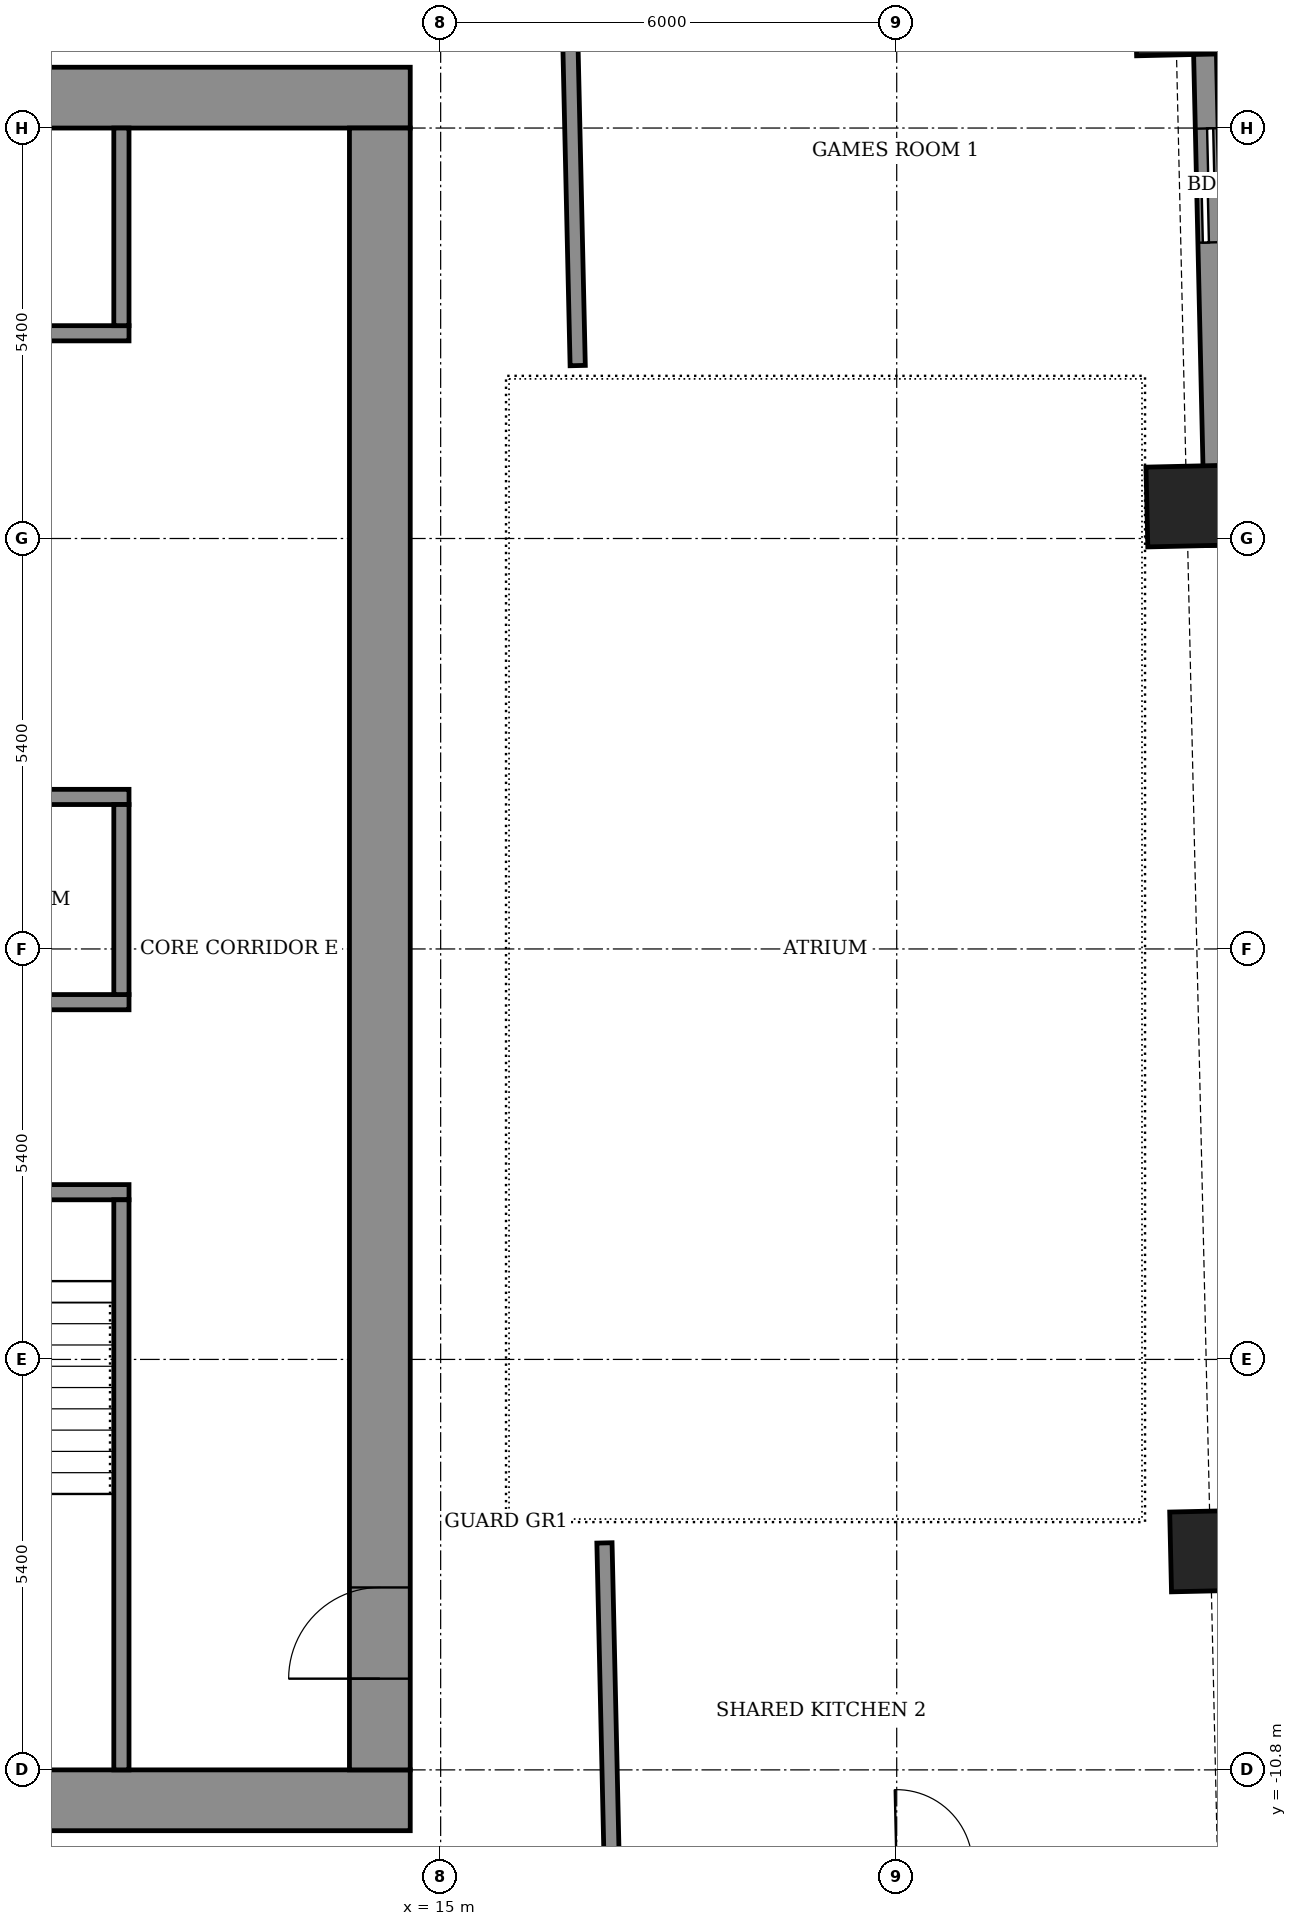
"""IFC4 building model, lengths in metres.
Left out: names, types, materials, properties, quantities, classifications, styles, units other than length and angle.
Written with IfcOpenShell. Run it as: python <this file> out.ifc"""

import sys

from ifc_helpers import new_model, si_unit, direction, frame, frame_2d, origin, origin_2d, place, context, subcontext, project, spatial, rectangle, extrude, element, fill, save


model = new_model("IFC4")
c1 = context("Model", 3, precision=1e-05, world=origin(), true_north=direction((0.0, 1.0)))
c2 = subcontext(c1, "Body", "Model", "MODEL_VIEW")
j1 = project(units=[si_unit("LENGTHUNIT", "METRE"), si_unit("PLANEANGLEUNIT", "RADIAN")], contexts=[c1])
p1 = place(None, origin())
s1 = spatial("IfcSite", under=j1, at=p1, CompositionType="ELEMENT")
p2 = place(p1, origin())
s2 = spatial("IfcBuilding", under=s1, at=p2, CompositionType="ELEMENT")
p3 = place(p2, frame((0.0, 0.0, 241.9)))
s3 = spatial("IfcBuildingStorey", under=s2, at=p3, CompositionType="ELEMENT", Elevation=241.9)
for number, where, z_axis, x_axis in (
    (1, (25.128, -7.921, -0.55), (0.0, 0.0, 1.0), (-0.023, 1.0, 0.0)),
    (2, (24.816, 5.826, -0.55), (0.0, 0.0, 1.0), (-0.023, 1.0, 0.0)),
    (3, (24.669, 12.287, -0.55), (0.0, 0.0, 1.0), (-0.023, 1.0, 0.0)),
):
    element("IfcColumn", number, at=place(p3, frame(where, z_axis=z_axis, x_axis=x_axis)), inside=s3, PredefinedType="COLUMN", context=c2, shape_type="SweptSolid", body=[
        extrude(rectangle(XDim=1.05, YDim=1.05, at=origin_2d()), origin(), (0.0, 0.0, 1.0), 3.6),
    ])
p4 = place(p3, frame((25.203, 5.31, 0.0), z_axis=(0.0, 0.0, 1.0), x_axis=(-0.022708061432, 0.999742138727, 0.0)))
e4 = element("IfcWall", 4, at=p4, inside=s3, PredefinedType="SOLIDWALL", context=c2, shape_type="SweptSolid", body=[
    extrude(rectangle(XDim=13.299, YDim=0.3, at=frame_2d((6.65, 0.0))), origin(), (0.0, 0.0, 1.0), 2.55),
])
p5 = place(p4, frame((3.986, 0.0, 0.0)))
e5 = element("IfcOpeningElement", 5, at=p5, cuts=e4, PredefinedType="OPENING", context=c2, shape_type="SweptSolid", body=[
    extrude(rectangle(XDim=1.5, YDim=2.4, at=frame_2d((0.75, 1.2))), frame((0.0, 0.16, 0.0), z_axis=(0.0, -1.0, 0.0), x_axis=(1.0, 0.0, 0.0)), (0.0, 0.0, 1.0), 0.32),
])
p6 = place(p4, frame((9.013, 0.0, 0.9)))
e6 = element("IfcOpeningElement", 6, at=p6, cuts=e4, PredefinedType="OPENING", context=c2, shape_type="SweptSolid", body=[
    extrude(rectangle(XDim=2.4, YDim=1.5, at=frame_2d((1.2, 0.75))), frame((0.0, 0.16, 0.0), z_axis=(0.0, -1.0, 0.0), x_axis=(1.0, 0.0, 0.0)), (0.0, 0.0, 1.0), 0.32),
])
p7 = place(p3, frame((17.253, -12.149, 0.0), z_axis=(0.0, 0.0, 1.0), x_axis=(-0.022578158225, 0.999745080894, 0.0)))
e7 = element("IfcWall", 7, at=p7, inside=s3, PredefinedType="PARTITIONING", context=c2, shape_type="SweptSolid", body=[
    extrude(rectangle(XDim=4.336, YDim=0.2, at=frame_2d((2.168, 0.0))), origin(), (0.0, 0.0, 1.0), 3.05),
])
p8 = place(p3, frame((16.803, 7.675, 0.0), z_axis=(0.0, 0.0, 1.0), x_axis=(-0.022667483124, 0.999743059595, 0.0)))
e8 = element("IfcWall", 8, at=p8, inside=s3, PredefinedType="PARTITIONING", context=c2, shape_type="SweptSolid", body=[
    extrude(rectangle(XDim=5.245, YDim=0.2, at=frame_2d((2.623, 0.0))), origin(), (0.0, 0.0, 1.0), 3.05),
])
for number, where, z_axis, x_axis in (
    (9, (-14.6, -11.2, 0.0), (0.0, 0.0, 1.0), (1.0, 0.0, 0.0)),
    (10, (-14.6, 11.2, 0.0), (0.0, 0.0, 1.0), (1.0, 0.0, 0.0)),
):
    element("IfcWall", number, at=place(p3, frame(where, z_axis=z_axis, x_axis=x_axis)), inside=s3, PredefinedType="SHEAR", context=c2, shape_type="SweptSolid", body=[
        extrude(rectangle(XDim=29.2, YDim=0.8, at=frame_2d((14.6, 0.0))), origin(), (0.0, 0.0, 1.0), 3.6),
    ])
p9 = place(p3, frame((14.2, -10.8, 0.0), z_axis=(0.0, 0.0, 1.0), x_axis=(0.0, 1.0, 0.0)))
e11 = element("IfcWall", 11, at=p9, inside=s3, PredefinedType="SHEAR", context=c2, shape_type="SweptSolid", body=[
    extrude(rectangle(XDim=21.6, YDim=0.8, at=frame_2d((10.8, 0.0))), origin(), (0.0, 0.0, 1.0), 3.6),
])
p10 = place(p9, frame((1.2, 0.0, 0.0)))
e12 = element("IfcOpeningElement", 12, at=p10, cuts=e11, PredefinedType="OPENING", context=c2, shape_type="SweptSolid", body=[
    extrude(rectangle(XDim=1.2, YDim=2.1, at=frame_2d((0.6, 1.05))), frame((0.0, 0.41, 0.0), z_axis=(0.0, -1.0, 0.0), x_axis=(1.0, 0.0, 0.0)), (0.0, 0.0, 1.0), 0.82),
])
p11 = place(p3, frame((-10.9, -3.2, 0.0), z_axis=(0.0, 0.0, 1.0), x_axis=(1.0, 0.0, 0.0)))
e13 = element("IfcWall", 13, at=p11, inside=s3, PredefinedType="SHEAR", context=c2, shape_type="SweptSolid", body=[
    extrude(rectangle(XDim=21.8, YDim=0.2, at=frame_2d((10.9, 0.0))), origin(), (0.0, 0.0, 1.0), 3.05),
])
p12 = place(p11, frame((1.075, 0.0, 0.0)))
e14 = element("IfcOpeningElement", 14, at=p12, cuts=e13, PredefinedType="OPENING", context=c2, shape_type="SweptSolid", body=[
    extrude(rectangle(XDim=1.1, YDim=2.1, at=frame_2d((0.55, 1.05))), frame((0.0, 0.11, 0.0), z_axis=(0.0, -1.0, 0.0), x_axis=(1.0, 0.0, 0.0)), (0.0, 0.0, 1.0), 0.22),
])
p13 = place(p11, frame((10.325, 0.0, 0.0)))
e15 = element("IfcOpeningElement", 15, at=p13, cuts=e13, PredefinedType="OPENING", context=c2, shape_type="SweptSolid", body=[
    extrude(rectangle(XDim=1.1, YDim=2.1, at=frame_2d((0.55, 1.05))), frame((0.0, 0.11, 0.0), z_axis=(0.0, -1.0, 0.0), x_axis=(1.0, 0.0, 0.0)), (0.0, 0.0, 1.0), 0.22),
])
p14 = place(p11, frame((19.625, 0.0, 0.0)))
e16 = element("IfcOpeningElement", 16, at=p14, cuts=e13, PredefinedType="OPENING", context=c2, shape_type="SweptSolid", body=[
    extrude(rectangle(XDim=1.1, YDim=2.1, at=frame_2d((0.55, 1.05))), frame((0.0, 0.11, 0.0), z_axis=(0.0, -1.0, 0.0), x_axis=(1.0, 0.0, 0.0)), (0.0, 0.0, 1.0), 0.22),
])
p15 = place(p11, frame((5.7, 0.0, 0.0)))
e17 = element("IfcOpeningElement", 17, at=p15, cuts=e13, PredefinedType="OPENING", context=c2, shape_type="SweptSolid", body=[
    extrude(rectangle(XDim=1.1, YDim=2.1, at=frame_2d((0.55, 1.05))), frame((0.0, 0.11, 0.0), z_axis=(0.0, -1.0, 0.0), x_axis=(1.0, 0.0, 0.0)), (0.0, 0.0, 1.0), 0.22),
])
p16 = place(p11, frame((14.975, 0.0, 0.0)))
e18 = element("IfcOpeningElement", 18, at=p16, cuts=e13, PredefinedType="OPENING", context=c2, shape_type="SweptSolid", body=[
    extrude(rectangle(XDim=1.1, YDim=2.1, at=frame_2d((0.55, 1.05))), frame((0.0, 0.11, 0.0), z_axis=(0.0, -1.0, 0.0), x_axis=(1.0, 0.0, 0.0)), (0.0, 0.0, 1.0), 0.22),
])
p17 = place(p3, frame((-10.9, -0.7, 0.0), z_axis=(0.0, 0.0, 1.0), x_axis=(1.0, 0.0, 0.0)))
e19 = element("IfcWall", 19, at=p17, inside=s3, PredefinedType="SHEAR", context=c2, shape_type="SweptSolid", body=[
    extrude(rectangle(XDim=21.8, YDim=0.2, at=frame_2d((10.9, 0.0))), origin(), (0.0, 0.0, 1.0), 3.05),
])
p18 = place(p3, frame((-10.9, 2.0, 0.0), z_axis=(0.0, 0.0, 1.0), x_axis=(1.0, 0.0, 0.0)))
e20 = element("IfcWall", 20, at=p18, inside=s3, PredefinedType="SHEAR", context=c2, shape_type="SweptSolid", body=[
    extrude(rectangle(XDim=21.8, YDim=0.2, at=frame_2d((10.9, 0.0))), origin(), (0.0, 0.0, 1.0), 3.05),
])
p19 = place(p18, frame((4.95, 0.0, 0.0)))
e21 = element("IfcOpeningElement", 21, at=p19, cuts=e20, PredefinedType="OPENING", context=c2, shape_type="SweptSolid", body=[
    extrude(rectangle(XDim=1.1, YDim=2.1, at=frame_2d((0.55, 1.05))), frame((0.0, 0.11, 0.0), z_axis=(0.0, -1.0, 0.0), x_axis=(1.0, 0.0, 0.0)), (0.0, 0.0, 1.0), 0.22),
])
p20 = place(p18, frame((7.65, 0.0, 0.0)))
e22 = element("IfcOpeningElement", 22, at=p20, cuts=e20, PredefinedType="OPENING", context=c2, shape_type="SweptSolid", body=[
    extrude(rectangle(XDim=1.1, YDim=2.1, at=frame_2d((0.55, 1.05))), frame((0.0, 0.11, 0.0), z_axis=(0.0, -1.0, 0.0), x_axis=(1.0, 0.0, 0.0)), (0.0, 0.0, 1.0), 0.22),
])
p21 = place(p18, frame((10.35, 0.0, 0.0)))
e23 = element("IfcOpeningElement", 23, at=p21, cuts=e20, PredefinedType="OPENING", context=c2, shape_type="SweptSolid", body=[
    extrude(rectangle(XDim=1.1, YDim=2.1, at=frame_2d((0.55, 1.05))), frame((0.0, 0.11, 0.0), z_axis=(0.0, -1.0, 0.0), x_axis=(1.0, 0.0, 0.0)), (0.0, 0.0, 1.0), 0.22),
])
p22 = place(p18, frame((1.675, 0.0, 0.0)))
e24 = element("IfcOpeningElement", 24, at=p22, cuts=e20, PredefinedType="OPENING", context=c2, shape_type="SweptSolid", body=[
    extrude(rectangle(XDim=0.9, YDim=2.1, at=frame_2d((0.45, 1.05))), frame((0.0, 0.11, 0.0), z_axis=(0.0, -1.0, 0.0), x_axis=(1.0, 0.0, 0.0)), (0.0, 0.0, 1.0), 0.22),
])
p23 = place(p18, frame((14.5, 0.0, 0.0)))
e25 = element("IfcOpeningElement", 25, at=p23, cuts=e20, PredefinedType="OPENING", context=c2, shape_type="SweptSolid", body=[
    extrude(rectangle(XDim=0.9, YDim=2.1, at=frame_2d((0.45, 1.05))), frame((0.0, 0.11, 0.0), z_axis=(0.0, -1.0, 0.0), x_axis=(1.0, 0.0, 0.0)), (0.0, 0.0, 1.0), 0.22),
])
p24 = place(p18, frame((19.225, 0.0, 0.0)))
e26 = element("IfcOpeningElement", 26, at=p24, cuts=e20, PredefinedType="OPENING", context=c2, shape_type="SweptSolid", body=[
    extrude(rectangle(XDim=0.9, YDim=2.1, at=frame_2d((0.45, 1.05))), frame((0.0, 0.11, 0.0), z_axis=(0.0, -1.0, 0.0), x_axis=(1.0, 0.0, 0.0)), (0.0, 0.0, 1.0), 0.22),
])
p25 = place(p3, frame((-10.9, 8.1, 0.0), z_axis=(0.0, 0.0, 1.0), x_axis=(1.0, 0.0, 0.0)))
e27 = element("IfcWall", 27, at=p25, inside=s3, PredefinedType="SHEAR", context=c2, shape_type="SweptSolid", body=[
    extrude(rectangle(XDim=21.8, YDim=0.2, at=frame_2d((10.9, 0.0))), origin(), (0.0, 0.0, 1.0), 3.05),
])
p26 = place(p25, frame((4.95, 0.0, 0.0)))
e28 = element("IfcOpeningElement", 28, at=p26, cuts=e27, PredefinedType="OPENING", context=c2, shape_type="SweptSolid", body=[
    extrude(rectangle(XDim=1.1, YDim=2.1, at=frame_2d((0.55, 1.05))), frame((0.0, 0.11, 0.0), z_axis=(0.0, -1.0, 0.0), x_axis=(1.0, 0.0, 0.0)), (0.0, 0.0, 1.0), 0.22),
])
p27 = place(p25, frame((7.65, 0.0, 0.0)))
e29 = element("IfcOpeningElement", 29, at=p27, cuts=e27, PredefinedType="OPENING", context=c2, shape_type="SweptSolid", body=[
    extrude(rectangle(XDim=1.1, YDim=2.1, at=frame_2d((0.55, 1.05))), frame((0.0, 0.11, 0.0), z_axis=(0.0, -1.0, 0.0), x_axis=(1.0, 0.0, 0.0)), (0.0, 0.0, 1.0), 0.22),
])
p28 = place(p25, frame((10.35, 0.0, 0.0)))
e30 = element("IfcOpeningElement", 30, at=p28, cuts=e27, PredefinedType="OPENING", context=c2, shape_type="SweptSolid", body=[
    extrude(rectangle(XDim=1.1, YDim=2.1, at=frame_2d((0.55, 1.05))), frame((0.0, 0.11, 0.0), z_axis=(0.0, -1.0, 0.0), x_axis=(1.0, 0.0, 0.0)), (0.0, 0.0, 1.0), 0.22),
])
p29 = place(p25, frame((1.675, 0.0, 0.0)))
e31 = element("IfcOpeningElement", 31, at=p29, cuts=e27, PredefinedType="OPENING", context=c2, shape_type="SweptSolid", body=[
    extrude(rectangle(XDim=0.9, YDim=2.1, at=frame_2d((0.45, 1.05))), frame((0.0, 0.11, 0.0), z_axis=(0.0, -1.0, 0.0), x_axis=(1.0, 0.0, 0.0)), (0.0, 0.0, 1.0), 0.22),
])
p30 = place(p25, frame((14.5, 0.0, 0.0)))
e32 = element("IfcOpeningElement", 32, at=p30, cuts=e27, PredefinedType="OPENING", context=c2, shape_type="SweptSolid", body=[
    extrude(rectangle(XDim=0.9, YDim=2.1, at=frame_2d((0.45, 1.05))), frame((0.0, 0.11, 0.0), z_axis=(0.0, -1.0, 0.0), x_axis=(1.0, 0.0, 0.0)), (0.0, 0.0, 1.0), 0.22),
])
p31 = place(p25, frame((19.225, 0.0, 0.0)))
e33 = element("IfcOpeningElement", 33, at=p31, cuts=e27, PredefinedType="OPENING", context=c2, shape_type="SweptSolid", body=[
    extrude(rectangle(XDim=0.9, YDim=2.1, at=frame_2d((0.45, 1.05))), frame((0.0, 0.11, 0.0), z_axis=(0.0, -1.0, 0.0), x_axis=(1.0, 0.0, 0.0)), (0.0, 0.0, 1.0), 0.22),
])
p32 = place(p3, frame((10.8, -10.8, 0.0), z_axis=(0.0, 0.0, 1.0), x_axis=(0.0, 1.0, 0.0)))
e34 = element("IfcWall", 34, at=p32, inside=s3, PredefinedType="SHEAR", context=c2, shape_type="SweptSolid", body=[
    extrude(rectangle(XDim=7.5, YDim=0.2, at=frame_2d((3.75, 0.0))), origin(), (0.0, 0.0, 1.0), 3.05),
])
p33 = place(p3, frame((10.8, -0.6, 0.0), z_axis=(0.0, 0.0, 1.0), x_axis=(0.0, 1.0, 0.0)))
e35 = element("IfcWall", 35, at=p33, inside=s3, PredefinedType="STANDARD", context=c2, shape_type="SweptSolid", body=[
    extrude(rectangle(XDim=2.5, YDim=0.2, at=frame_2d((1.25, 0.0))), origin(), (0.0, 0.0, 1.0), 3.05),
])
p34 = place(p3, frame((10.8, 8.2, 0.0), z_axis=(0.0, 0.0, 1.0), x_axis=(0.0, 1.0, 0.0)))
e36 = element("IfcWall", 36, at=p34, inside=s3, PredefinedType="STANDARD", context=c2, shape_type="SweptSolid", body=[
    extrude(rectangle(XDim=2.6, YDim=0.2, at=frame_2d((1.3, 0.0))), origin(), (0.0, 0.0, 1.0), 3.05),
])
p35 = place(p5, origin())
e37 = element("IfcDoor", 37, at=p35, inside=s3, OperationType="SLIDING_TO_LEFT", PredefinedType="DOOR", context=c2, shape_type="SweptSolid", body=[
    extrude(rectangle(XDim=1.5, YDim=2.4, at=frame_2d((0.75, 1.2))), frame((0.0, 0.025, 0.0), z_axis=(0.0, -1.0, 0.0), x_axis=(1.0, 0.0, 0.0)), (0.0, 0.0, 1.0), 0.05),
])
fill(e5, e37)
p36 = place(p10, origin())
e38 = element("IfcDoor", 38, at=p36, inside=s3, OperationType="DOUBLE_DOOR_SINGLE_SWING", PredefinedType="DOOR", context=c2, shape_type="SweptSolid", body=[
    extrude(rectangle(XDim=1.2, YDim=2.1, at=frame_2d((0.6, 1.05))), frame((0.0, 0.025, 0.0), z_axis=(0.0, -1.0, 0.0), x_axis=(1.0, 0.0, 0.0)), (0.0, 0.0, 1.0), 0.05),
])
fill(e12, e38)
save(model, sys.argv[1])
